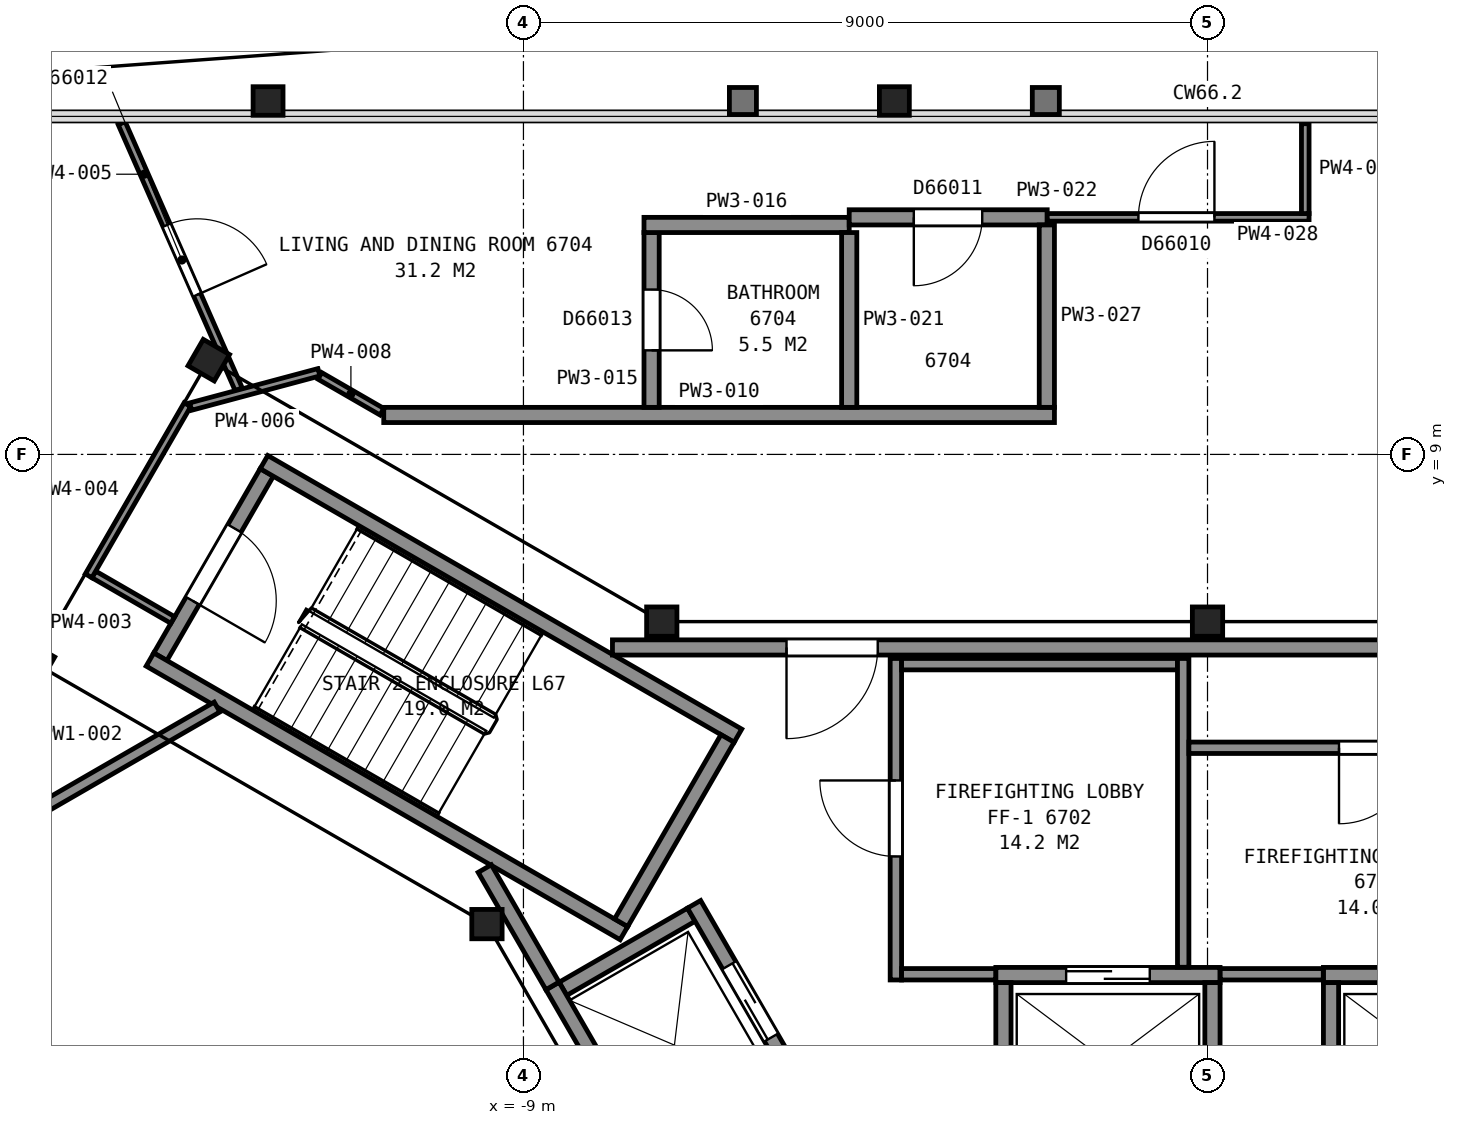
"""IFC4 building model, lengths in metres.
Left out: names, types, materials, properties, quantities, classifications, styles, units other than length and angle.
Written with IfcOpenShell. Run it as: python <this file> out.ifc"""

import sys

from ifc_helpers import new_model, si_unit, direction, frame, frame_2d, origin, origin_2d, place, context, subcontext, project, spatial, rectangle, i_section, extrude, element, fill, save


model = new_model("IFC4")
c1 = context("Model", 3, precision=1e-05, world=origin(), true_north=direction((0.0, 1.0)))
c2 = subcontext(c1, "Body", "Model", "MODEL_VIEW")
j1 = project(units=[si_unit("LENGTHUNIT", "METRE"), si_unit("PLANEANGLEUNIT", "RADIAN")], contexts=[c1])
p1 = place(None, origin())
s1 = spatial("IfcSite", under=j1, at=p1, CompositionType="ELEMENT")
p2 = place(p1, origin())
s2 = spatial("IfcBuilding", under=s1, at=p2, CompositionType="ELEMENT")
p3 = place(p2, frame((0.0, 0.0, 267.7)))
s3 = spatial("IfcBuildingStorey", under=s2, at=p3, CompositionType="ELEMENT", Elevation=267.7)
for number, where, z_axis, x_axis in (
    (1, (-4.12, 13.65, 0.0), (0.0, 0.0, 1.0), (1.0, 0.0, 0.0)),
    (2, (-12.36, 13.65, 0.0), (0.0, 0.0, 1.0), (1.0, 0.0, 0.0)),
):
    element("IfcColumn", number, at=place(p3, frame(where, z_axis=z_axis, x_axis=x_axis)), inside=s3, PredefinedType="COLUMN", context=c2, shape_type="SweptSolid", body=[
        extrude(i_section(OverallWidth=0.394, OverallDepth=0.376, WebThickness=0.017, FlangeThickness=0.028, FilletRadius=0.015, at=origin_2d()), origin(), (0.0, 0.0, 1.0), 3.7),
    ])
for number, where, z_axis, x_axis in (
    (3, (0.0, 6.8, 0.0), (0.0, 0.0, 1.0), (1.0, 0.0, 0.0)),
    (4, (-7.18, 6.8, 0.0), (0.0, 0.0, 1.0), (1.0, 0.0, 0.0)),
):
    element("IfcColumn", number, at=place(p3, frame(where, z_axis=z_axis, x_axis=x_axis)), inside=s3, PredefinedType="COLUMN", context=c2, shape_type="SweptSolid", body=[
        extrude(i_section(OverallWidth=0.399, OverallDepth=0.386, WebThickness=0.021, FlangeThickness=0.033, FilletRadius=0.015, at=origin_2d()), origin(), (0.0, 0.0, 1.0), 3.7),
    ])
for number, where, z_axis, x_axis in (
    (5, (-13.14, 10.24, 0.0), (0.0, 0.0, 1.0), (0.5, 0.866, 0.0)),
    (6, (-15.44, 6.26, 0.0), (0.0, 0.0, 1.0), (0.5, 0.866, 0.0)),
):
    element("IfcColumn", number, at=place(p3, frame(where, z_axis=z_axis, x_axis=x_axis)), inside=s3, PredefinedType="COLUMN", context=c2, shape_type="SweptSolid", body=[
        extrude(i_section(OverallWidth=0.401, OverallDepth=0.399, WebThickness=0.025, FlangeThickness=0.04, FilletRadius=0.015, at=origin_2d()), origin(), (0.0, 0.0, 1.0), 3.7),
    ])
p4 = place(p3, frame((-9.48, 2.82, 0.0), z_axis=(0.0, 0.0, 1.0), x_axis=(1.0, 0.0, 0.0)))
e7 = element("IfcColumn", 7, at=p4, inside=s3, PredefinedType="COLUMN", context=c2, shape_type="SweptSolid", body=[
    extrude(i_section(OverallWidth=0.399, OverallDepth=0.386, WebThickness=0.021, FlangeThickness=0.033, FilletRadius=0.015, at=origin_2d()), origin(), (0.0, 0.0, 1.0), 3.7),
])
p5 = place(p3, frame((-12.377, 8.762, 0.0), z_axis=(0.0, 0.0, 1.0), x_axis=(-0.500049511043, -0.865996816683, 0.0)))
e8 = element("IfcWall", 8, at=p5, inside=s3, PredefinedType="PARTITIONING", context=c2, shape_type="SweptSolid", body=[
    extrude(rectangle(XDim=2.8, YDim=0.2, at=frame_2d((1.4, 0.0))), origin(), (0.0, 0.0, 1.0), 3.45),
])
p6 = place(p5, frame((0.85, 0.0, 0.0)))
e9 = element("IfcOpeningElement", 9, at=p6, cuts=e8, PredefinedType="OPENING", context=c2, shape_type="SweptSolid", body=[
    extrude(rectangle(XDim=1.1, YDim=2.1, at=frame_2d((0.55, 1.05))), frame((0.0, 0.11, 0.0), z_axis=(0.0, -1.0, 0.0), x_axis=(1.0, 0.0, 0.0)), (0.0, 0.0, 1.0), 0.22),
])
for number, where, z_axis, x_axis in (
    (10, (-7.678, 2.701, 0.0), (0.0, 0.0, 1.0), (-0.866, 0.5, 0.0)),
    (11, (-6.178, 5.299, 0.0), (0.0, 0.0, 1.0), (-0.866, 0.5, 0.0)),
):
    element("IfcWall", number, at=place(p3, frame(where, z_axis=z_axis, x_axis=x_axis)), inside=s3, PredefinedType="PARTITIONING", context=c2, shape_type="SweptSolid", body=[
        extrude(rectangle(XDim=7.2, YDim=0.2, at=frame_2d((3.6, 0.0))), origin(), (0.0, 0.0, 1.0), 3.45),
    ])
p7 = place(p3, frame((-6.315, 5.262, 0.0), z_axis=(0.0, 0.0, 1.0), x_axis=(-0.500049511043, -0.865996816683, 0.0)))
e12 = element("IfcWall", 12, at=p7, inside=s3, PredefinedType="PARTITIONING", context=c2, shape_type="SweptSolid", body=[
    extrude(rectangle(XDim=2.8, YDim=0.2, at=frame_2d((1.4, 0.0))), origin(), (0.0, 0.0, 1.0), 3.45),
])
p8 = place(p3, frame((-2.785, 2.15, 0.0), z_axis=(0.0, 0.0, 1.0), x_axis=(1.0, 0.0, 0.0)))
e13 = element("IfcWall", 13, at=p8, inside=s3, PredefinedType="PARTITIONING", context=c2, shape_type="SweptSolid", body=[
    extrude(rectangle(XDim=2.95, YDim=0.2, at=frame_2d((1.475, 0.0))), origin(), (0.0, 0.0, 1.0), 3.7),
])
p9 = place(p8, frame((0.925, 0.0, 0.0)))
e14 = element("IfcOpeningElement", 14, at=p9, cuts=e13, PredefinedType="OPENING", context=c2, shape_type="SweptSolid", body=[
    extrude(rectangle(XDim=1.1, YDim=2.1, at=frame_2d((0.55, 1.05))), frame((0.0, 0.11, 0.0), z_axis=(0.0, -1.0, 0.0), x_axis=(1.0, 0.0, 0.0)), (0.0, 0.0, 1.0), 0.22),
])
p10 = place(p3, frame((1.525, 2.15, 0.0), z_axis=(0.0, 0.0, 1.0), x_axis=(1.0, 0.0, 0.0)))
e15 = element("IfcWall", 15, at=p10, inside=s3, PredefinedType="PARTITIONING", context=c2, shape_type="SweptSolid", body=[
    extrude(rectangle(XDim=2.95, YDim=0.2, at=frame_2d((1.475, 0.0))), origin(), (0.0, 0.0, 1.0), 3.7),
])
p11 = place(p10, frame((0.925, 0.0, 0.0)))
e16 = element("IfcOpeningElement", 16, at=p11, cuts=e15, PredefinedType="OPENING", context=c2, shape_type="SweptSolid", body=[
    extrude(rectangle(XDim=1.1, YDim=2.1, at=frame_2d((0.55, 1.05))), frame((0.0, 0.11, 0.0), z_axis=(0.0, -1.0, 0.0), x_axis=(1.0, 0.0, 0.0)), (0.0, 0.0, 1.0), 0.22),
])
for number, where, z_axis, x_axis in (
    (17, (-8.48, 1.969, 0.0), (0.0, 0.0, 1.0), (0.866, 0.5, 0.0)),
    (18, (1.625, 0.1, 0.0), (0.0, 0.0, 1.0), (0.0, 1.0, 0.0)),
    (19, (0.065, 0.1, 0.0), (0.0, 0.0, 1.0), (0.0, 1.0, 0.0)),
    (20, (-2.685, 0.1, 0.0), (0.0, 0.0, 1.0), (0.0, 1.0, 0.0)),
):
    element("IfcWall", number, at=place(p3, frame(where, z_axis=z_axis, x_axis=x_axis)), inside=s3, PredefinedType="PARTITIONING", context=c2, shape_type="SweptSolid", body=[
        extrude(rectangle(XDim=1.95, YDim=0.2, at=frame_2d((0.975, 0.0))), origin(), (0.0, 0.0, 1.0), 3.7),
    ])
p12 = place(p3, frame((-5.28, 0.525, 0.0), z_axis=(0.0, 0.0, 1.0), x_axis=(-0.500037662692, 0.866003658127, 0.0)))
e21 = element("IfcWall", 21, at=p12, inside=s3, PredefinedType="PARTITIONING", context=c2, shape_type="SweptSolid", body=[
    extrude(rectangle(XDim=2.95, YDim=0.2, at=frame_2d((1.475, 0.0))), origin(), (0.0, 0.0, 1.0), 3.7),
])
p13 = place(p12, frame((0.925, 0.0, 0.0)))
e22 = element("IfcOpeningElement", 22, at=p13, cuts=e21, PredefinedType="OPENING", context=c2, shape_type="SweptSolid", body=[
    extrude(rectangle(XDim=1.1, YDim=2.1, at=frame_2d((0.55, 1.05))), frame((0.0, 0.11, 0.0), z_axis=(0.0, -1.0, 0.0), x_axis=(1.0, 0.0, 0.0)), (0.0, 0.0, 1.0), 0.22),
])
p14 = place(p3, frame((-7.142, -0.55, 0.0), z_axis=(0.0, 0.0, 1.0), x_axis=(-0.49997559174, 0.866039495442, 0.0)))
e23 = element("IfcWall", 23, at=p14, inside=s3, PredefinedType="PARTITIONING", context=c2, shape_type="SweptSolid", body=[
    extrude(rectangle(XDim=2.95, YDim=0.2, at=frame_2d((1.475, 0.0))), origin(), (0.0, 0.0, 1.0), 3.7),
])
p15 = place(p3, frame((-9.509, 3.551, 0.0), z_axis=(0.0, 0.0, 1.0), x_axis=(0.499999136801, -0.866025902152, 0.0)))
e24 = element("IfcWall", 24, at=p15, inside=s3, PredefinedType="PARTITIONING", context=c2, shape_type="SweptSolid", body=[
    extrude(rectangle(XDim=1.782, YDim=0.2, at=frame_2d((0.891, 0.0))), origin(), (0.0, 0.0, 1.0), 3.45),
])
p16 = place(p3, frame((7.829, 6.46, 0.0), z_axis=(0.0, 0.0, 1.0), x_axis=(-1.0, 0.0, 0.0)))
e25 = element("IfcWall", 25, at=p16, inside=s3, PredefinedType="PARTITIONING", context=c2, shape_type="SweptSolid", body=[
    extrude(rectangle(XDim=15.658, YDim=0.2, at=frame_2d((7.829, 0.0))), origin(), (0.0, 0.0, 1.0), 3.45),
])
p17 = place(p16, frame((12.168, 0.0, 0.0)))
e26 = element("IfcOpeningElement", 26, at=p17, cuts=e25, PredefinedType="OPENING", context=c2, shape_type="SweptSolid", body=[
    extrude(rectangle(XDim=1.2, YDim=2.1, at=frame_2d((0.6, 1.05))), frame((0.0, 0.11, 0.0), z_axis=(0.0, -1.0, 0.0), x_axis=(1.0, 0.0, 0.0)), (0.0, 0.0, 1.0), 0.22),
])
p18 = place(p3, frame((-4.1, 2.085, 0.0), z_axis=(0.0, 0.0, 1.0), x_axis=(0.0, 1.0, 0.0)))
e27 = element("IfcWall", 27, at=p18, inside=s3, PredefinedType="PARTITIONING", context=c2, shape_type="SweptSolid", body=[
    extrude(rectangle(XDim=4.23, YDim=0.15, at=frame_2d((2.115, 0.0))), origin(), (0.0, 0.0, 1.0), 3.45),
])
p19 = place(p18, frame((1.625, 0.0, 0.0)))
e28 = element("IfcOpeningElement", 28, at=p19, cuts=e27, PredefinedType="OPENING", context=c2, shape_type="SweptSolid", body=[
    extrude(rectangle(XDim=1.0, YDim=2.1, at=frame_2d((0.5, 1.05))), frame((0.0, 0.085, 0.0), z_axis=(0.0, -1.0, 0.0), x_axis=(1.0, 0.0, 0.0)), (0.0, 0.0, 1.0), 0.17),
])
p20 = place(p3, frame((-4.025, 2.16, 0.0), z_axis=(0.0, 0.0, 1.0), x_axis=(1.0, 0.0, 0.0)))
e29 = element("IfcWall", 29, at=p20, inside=s3, PredefinedType="PARTITIONING", context=c2, shape_type="SweptSolid", body=[
    extrude(rectangle(XDim=1.238, YDim=0.15, at=frame_2d((0.619, 0.0))), origin(), (0.0, 0.0, 1.0), 3.45),
])
p21 = place(p3, frame((-4.025, 6.24, 0.0), z_axis=(0.0, 0.0, 1.0), x_axis=(1.0, 0.0, 0.0)))
e30 = element("IfcWall", 30, at=p21, inside=s3, PredefinedType="PARTITIONING", context=c2, shape_type="SweptSolid", body=[
    extrude(rectangle(XDim=3.63, YDim=0.15, at=frame_2d((1.815, 0.0))), origin(), (0.0, 0.0, 1.0), 3.45),
])
p22 = place(p3, frame((-0.32, 2.252, 0.0), z_axis=(0.0, 0.0, 1.0), x_axis=(0.0, 1.0, 0.0)))
e31 = element("IfcWall", 31, at=p22, inside=s3, PredefinedType="PARTITIONING", context=c2, shape_type="SweptSolid", body=[
    extrude(rectangle(XDim=4.063, YDim=0.15, at=frame_2d((2.031, 0.0))), origin(), (0.0, 0.0, 1.0), 3.45),
])
p23 = place(p3, frame((-0.245, 5.14, 0.0), z_axis=(0.0, 0.0, 1.0), x_axis=(1.0, 0.0, 0.0)))
e32 = element("IfcWall", 32, at=p23, inside=s3, PredefinedType="PARTITIONING", context=c2, shape_type="SweptSolid", body=[
    extrude(rectangle(XDim=5.11, YDim=0.15, at=frame_2d((2.555, 0.0))), origin(), (0.0, 0.0, 1.0), 3.45),
])
p24 = place(p23, frame((1.975, 0.0, 0.0)))
e33 = element("IfcOpeningElement", 33, at=p24, cuts=e32, PredefinedType="OPENING", context=c2, shape_type="SweptSolid", body=[
    extrude(rectangle(XDim=1.0, YDim=2.1, at=frame_2d((0.5, 1.05))), frame((0.0, 0.085, 0.0), z_axis=(0.0, -1.0, 0.0), x_axis=(1.0, 0.0, 0.0)), (0.0, 0.0, 1.0), 0.17),
])
p25 = place(p3, frame((0.167, 2.16, 0.0), z_axis=(0.0, 0.0, 1.0), x_axis=(1.0, 0.0, 0.0)))
e34 = element("IfcWall", 34, at=p25, inside=s3, PredefinedType="PARTITIONING", context=c2, shape_type="SweptSolid", body=[
    extrude(rectangle(XDim=1.356, YDim=0.15, at=frame_2d((0.678, 0.0))), origin(), (0.0, 0.0, 1.0), 3.45),
])
p26 = place(p3, frame((-15.489, 4.257, 0.0), z_axis=(0.0, 0.0, 1.0), x_axis=(0.866053804324, 0.499950805595, 0.0)))
e35 = element("IfcWall", 35, at=p26, inside=s3, PredefinedType="PARTITIONING", context=c2, shape_type="SweptSolid", body=[
    extrude(rectangle(XDim=2.838, YDim=0.15, at=frame_2d((1.419, 0.0))), origin(), (0.0, 0.0, 1.0), 2.723),
])
p27 = place(p3, frame((-14.653, 7.421, 0.0), z_axis=(0.0, 0.0, 1.0), x_axis=(0.865941482684, -0.500145327446, 0.0)))
e36 = element("IfcWall", 36, at=p27, inside=s3, PredefinedType="PARTITIONING", context=c2, shape_type="SweptSolid", body=[
    extrude(rectangle(XDim=1.199, YDim=0.1, at=frame_2d((0.6, 0.0))), origin(), (0.0, 0.0, 1.0), 2.723),
])
p28 = place(p3, frame((-14.721, 7.403, 0.0), z_axis=(0.0, 0.0, 1.0), x_axis=(0.500006934395, 0.866021400173, 0.0)))
e37 = element("IfcWall", 37, at=p28, inside=s3, PredefinedType="PARTITIONING", context=c2, shape_type="SweptSolid", body=[
    extrude(rectangle(XDim=2.6, YDim=0.1, at=frame_2d((1.3, 0.0))), origin(), (0.0, 0.0, 1.0), 2.723),
])
p29 = place(p3, frame((-12.747, 9.857, 0.0), z_axis=(0.0, 0.0, 1.0), x_axis=(-0.402509649346, 0.91541574281, 0.0)))
e38 = element("IfcWall", 38, at=p29, inside=s3, PredefinedType="PARTITIONING", context=c2, shape_type="SweptSolid", body=[
    extrude(rectangle(XDim=3.824, YDim=0.1, at=frame_2d((1.912, 0.0))), origin(), (0.0, 0.0, 1.0), 2.723),
])
p30 = place(p29, frame((1.357, 0.0, 0.0)))
e39 = element("IfcOpeningElement", 39, at=p30, cuts=e38, PredefinedType="OPENING", context=c2, shape_type="SweptSolid", body=[
    extrude(rectangle(XDim=1.0, YDim=2.1, at=frame_2d((0.5, 1.05))), frame((0.0, 0.06, 0.0), z_axis=(0.0, -1.0, 0.0), x_axis=(1.0, 0.0, 0.0)), (0.0, 0.0, 1.0), 0.12),
])
p31 = place(p3, frame((-13.378, 9.629, 0.0), z_axis=(0.0, 0.0, 1.0), x_axis=(0.966007272337, 0.258514892785, 0.0)))
e40 = element("IfcWall", 40, at=p31, inside=s3, PredefinedType="PARTITIONING", context=c2, shape_type="SweptSolid", body=[
    extrude(rectangle(XDim=1.747, YDim=0.1, at=frame_2d((0.874, 0.0))), origin(), (0.0, 0.0, 1.0), 2.723),
])
p32 = place(p3, frame((-11.678, 10.033, 0.0), z_axis=(0.0, 0.0, 1.0), x_axis=(0.866116627388, -0.499841962787, 0.0)))
e41 = element("IfcWall", 41, at=p32, inside=s3, PredefinedType="PARTITIONING", context=c2, shape_type="SweptSolid", body=[
    extrude(rectangle(XDim=0.943, YDim=0.1, at=frame_2d((0.472, 0.0))), origin(), (0.0, 0.0, 1.0), 2.723),
])
p33 = place(p3, frame((-10.838, 9.519, 0.0), z_axis=(0.0, 0.0, 1.0), x_axis=(1.0, 0.0, 0.0)))
e42 = element("IfcWall", 42, at=p33, inside=s3, PredefinedType="PARTITIONING", context=c2, shape_type="SweptSolid", body=[
    extrude(rectangle(XDim=8.824, YDim=0.2, at=frame_2d((4.412, 0.0))), origin(), (0.0, 0.0, 1.0), 2.723),
])
p34 = place(p3, frame((-7.314, 11.919, 0.0), z_axis=(0.0, 0.0, 1.0), x_axis=(0.0, -1.0, 0.0)))
e43 = element("IfcWall", 43, at=p34, inside=s3, PredefinedType="PARTITIONING", context=c2, shape_type="SweptSolid", body=[
    extrude(rectangle(XDim=2.3, YDim=0.2, at=frame_2d((1.15, 0.0))), origin(), (0.0, 0.0, 1.0), 2.723),
])
p35 = place(p34, frame((0.75, 0.0, 0.0)))
e44 = element("IfcOpeningElement", 44, at=p35, cuts=e43, PredefinedType="OPENING", context=c2, shape_type="SweptSolid", body=[
    extrude(rectangle(XDim=0.8, YDim=2.1, at=frame_2d((0.4, 1.05))), frame((0.0, 0.11, 0.0), z_axis=(0.0, -1.0, 0.0), x_axis=(1.0, 0.0, 0.0)), (0.0, 0.0, 1.0), 0.22),
])
p36 = place(p3, frame((-7.414, 12.019, 0.0), z_axis=(0.0, 0.0, 1.0), x_axis=(1.0, 0.0, 0.0)))
e45 = element("IfcWall", 45, at=p36, inside=s3, PredefinedType="PARTITIONING", context=c2, shape_type="SweptSolid", body=[
    extrude(rectangle(XDim=2.7, YDim=0.2, at=frame_2d((1.35, 0.0))), origin(), (0.0, 0.0, 1.0), 2.723),
])
p37 = place(p3, frame((-4.714, 9.619, 0.0), z_axis=(0.0, 0.0, 1.0), x_axis=(0.0, 1.0, 0.0)))
e46 = element("IfcWall", 46, at=p37, inside=s3, PredefinedType="PARTITIONING", context=c2, shape_type="SweptSolid", body=[
    extrude(rectangle(XDim=2.3, YDim=0.2, at=frame_2d((1.15, 0.0))), origin(), (0.0, 0.0, 1.0), 2.723),
])
p38 = place(p3, frame((-2.109, 12.119, 0.0), z_axis=(0.0, 0.0, 1.0), x_axis=(-1.0, 0.0, 0.0)))
e47 = element("IfcWall", 47, at=p38, inside=s3, PredefinedType="PARTITIONING", context=c2, shape_type="SweptSolid", body=[
    extrude(rectangle(XDim=2.605, YDim=0.2, at=frame_2d((1.303, 0.0))), origin(), (0.0, 0.0, 1.0), 2.723),
])
p39 = place(p38, frame((0.855, 0.0, 0.0)))
e48 = element("IfcOpeningElement", 48, at=p39, cuts=e47, PredefinedType="OPENING", context=c2, shape_type="SweptSolid", body=[
    extrude(rectangle(XDim=0.9, YDim=2.1, at=frame_2d((0.45, 1.05))), frame((0.0, 0.11, 0.0), z_axis=(0.0, -1.0, 0.0), x_axis=(1.0, 0.0, 0.0)), (0.0, 0.0, 1.0), 0.22),
])
p40 = place(p3, frame((-2.114, 9.619, 0.0), z_axis=(0.0, 0.0, 1.0), x_axis=(0.0, 1.0, 0.0)))
e49 = element("IfcWall", 49, at=p40, inside=s3, PredefinedType="PARTITIONING", context=c2, shape_type="SweptSolid", body=[
    extrude(rectangle(XDim=2.4, YDim=0.2, at=frame_2d((1.2, 0.0))), origin(), (0.0, 0.0, 1.0), 2.723),
])
p41 = place(p3, frame((-2.109, 12.119, 0.0), z_axis=(0.0, 0.0, 1.0), x_axis=(1.0, 0.0, 0.0)))
e50 = element("IfcWall", 50, at=p41, inside=s3, PredefinedType="PARTITIONING", context=c2, shape_type="SweptSolid", body=[
    extrude(rectangle(XDim=3.445, YDim=0.1, at=frame_2d((1.722, 0.0))), origin(), (0.0, 0.0, 1.0), 2.723),
])
p42 = place(p41, frame((1.2, 0.0, 0.0)))
e51 = element("IfcOpeningElement", 51, at=p42, cuts=e50, PredefinedType="OPENING", context=c2, shape_type="SweptSolid", body=[
    extrude(rectangle(XDim=1.0, YDim=2.1, at=frame_2d((0.5, 1.05))), frame((0.0, 0.06, 0.0), z_axis=(0.0, -1.0, 0.0), x_axis=(1.0, 0.0, 0.0)), (0.0, 0.0, 1.0), 0.12),
])
p43 = place(p3, frame((1.286, 12.169, 0.0), z_axis=(0.0, 0.0, 1.0), x_axis=(0.0, 1.0, 0.0)))
e52 = element("IfcWall", 52, at=p43, inside=s3, PredefinedType="PARTITIONING", context=c2, shape_type="SweptSolid", body=[
    extrude(rectangle(XDim=1.182, YDim=0.1, at=frame_2d((0.591, 0.0))), origin(), (0.0, 0.0, 1.0), 2.723),
])
p44 = place(p6, origin())
e53 = element("IfcDoor", 53, at=p44, inside=s3, OperationType="SINGLE_SWING_RIGHT", PredefinedType="DOOR", context=c2, shape_type="SweptSolid", body=[
    extrude(rectangle(XDim=1.1, YDim=2.1, at=frame_2d((0.55, 1.05))), frame((0.0, 0.025, 0.0), z_axis=(0.0, -1.0, 0.0), x_axis=(1.0, 0.0, 0.0)), (0.0, 0.0, 1.0), 0.05),
])
fill(e9, e53)
p45 = place(p9, origin())
e54 = element("IfcDoor", 54, at=p45, inside=s3, OperationType="SLIDING_TO_LEFT", PredefinedType="DOOR", context=c2, shape_type="SweptSolid", body=[
    extrude(rectangle(XDim=1.1, YDim=2.1, at=frame_2d((0.55, 1.05))), frame((0.0, 0.025, 0.0), z_axis=(0.0, -1.0, 0.0), x_axis=(1.0, 0.0, 0.0)), (0.0, 0.0, 1.0), 0.05),
])
fill(e14, e54)
p46 = place(p13, origin())
e55 = element("IfcDoor", 55, at=p46, inside=s3, OperationType="SLIDING_TO_LEFT", PredefinedType="DOOR", context=c2, shape_type="SweptSolid", body=[
    extrude(rectangle(XDim=1.1, YDim=2.1, at=frame_2d((0.55, 1.05))), frame((0.0, 0.025, 0.0), z_axis=(0.0, -1.0, 0.0), x_axis=(1.0, 0.0, 0.0)), (0.0, 0.0, 1.0), 0.05),
])
fill(e22, e55)
p47 = place(p17, origin())
e56 = element("IfcDoor", 56, at=p47, inside=s3, OperationType="SINGLE_SWING_RIGHT", PredefinedType="DOOR", context=c2, shape_type="SweptSolid", body=[
    extrude(rectangle(XDim=1.2, YDim=2.1, at=frame_2d((0.6, 1.05))), frame((0.0, 0.025, 0.0), z_axis=(0.0, -1.0, 0.0), x_axis=(1.0, 0.0, 0.0)), (0.0, 0.0, 1.0), 0.05),
])
fill(e26, e56)
p48 = place(p19, origin())
e57 = element("IfcDoor", 57, at=p48, inside=s3, OperationType="SINGLE_SWING_RIGHT", PredefinedType="DOOR", context=c2, shape_type="SweptSolid", body=[
    extrude(rectangle(XDim=1.0, YDim=2.1, at=frame_2d((0.5, 1.05))), frame((0.0, 0.025, 0.0), z_axis=(0.0, -1.0, 0.0), x_axis=(1.0, 0.0, 0.0)), (0.0, 0.0, 1.0), 0.05),
])
fill(e28, e57)
p49 = place(p24, origin())
e58 = element("IfcDoor", 58, at=p49, inside=s3, OperationType="SINGLE_SWING_LEFT", PredefinedType="DOOR", context=c2, shape_type="SweptSolid", body=[
    extrude(rectangle(XDim=1.0, YDim=2.1, at=frame_2d((0.5, 1.05))), frame((0.0, 0.025, 0.0), z_axis=(0.0, -1.0, 0.0), x_axis=(1.0, 0.0, 0.0)), (0.0, 0.0, 1.0), 0.05),
])
fill(e33, e58)
p50 = place(p30, origin())
e59 = element("IfcDoor", 59, at=p50, inside=s3, OperationType="SINGLE_SWING_LEFT", PredefinedType="DOOR", context=c2, shape_type="SweptSolid", body=[
    extrude(rectangle(XDim=1.0, YDim=2.1, at=frame_2d((0.5, 1.05))), frame((0.0, 0.025, 0.0), z_axis=(0.0, -1.0, 0.0), x_axis=(1.0, 0.0, 0.0)), (0.0, 0.0, 1.0), 0.05),
])
fill(e39, e59)
p51 = place(p35, origin())
e60 = element("IfcDoor", 60, at=p51, inside=s3, OperationType="SINGLE_SWING_RIGHT", PredefinedType="DOOR", context=c2, shape_type="SweptSolid", body=[
    extrude(rectangle(XDim=0.8, YDim=2.1, at=frame_2d((0.4, 1.05))), frame((0.0, 0.025, 0.0), z_axis=(0.0, -1.0, 0.0), x_axis=(1.0, 0.0, 0.0)), (0.0, 0.0, 1.0), 0.05),
])
fill(e44, e60)
p52 = place(p39, origin())
e61 = element("IfcDoor", 61, at=p52, inside=s3, OperationType="SINGLE_SWING_RIGHT", PredefinedType="DOOR", context=c2, shape_type="SweptSolid", body=[
    extrude(rectangle(XDim=0.9, YDim=2.1, at=frame_2d((0.45, 1.05))), frame((0.0, 0.025, 0.0), z_axis=(0.0, -1.0, 0.0), x_axis=(1.0, 0.0, 0.0)), (0.0, 0.0, 1.0), 0.05),
])
fill(e48, e61)
p53 = place(p42, origin())
e62 = element("IfcDoor", 62, at=p53, inside=s3, OperationType="SINGLE_SWING_RIGHT", PredefinedType="DOOR", context=c2, shape_type="SweptSolid", body=[
    extrude(rectangle(XDim=1.0, YDim=2.1, at=frame_2d((0.5, 1.05))), frame((0.0, 0.025, 0.0), z_axis=(0.0, -1.0, 0.0), x_axis=(1.0, 0.0, 0.0)), (0.0, 0.0, 1.0), 0.05),
])
fill(e51, e62)
save(model, sys.argv[1])
